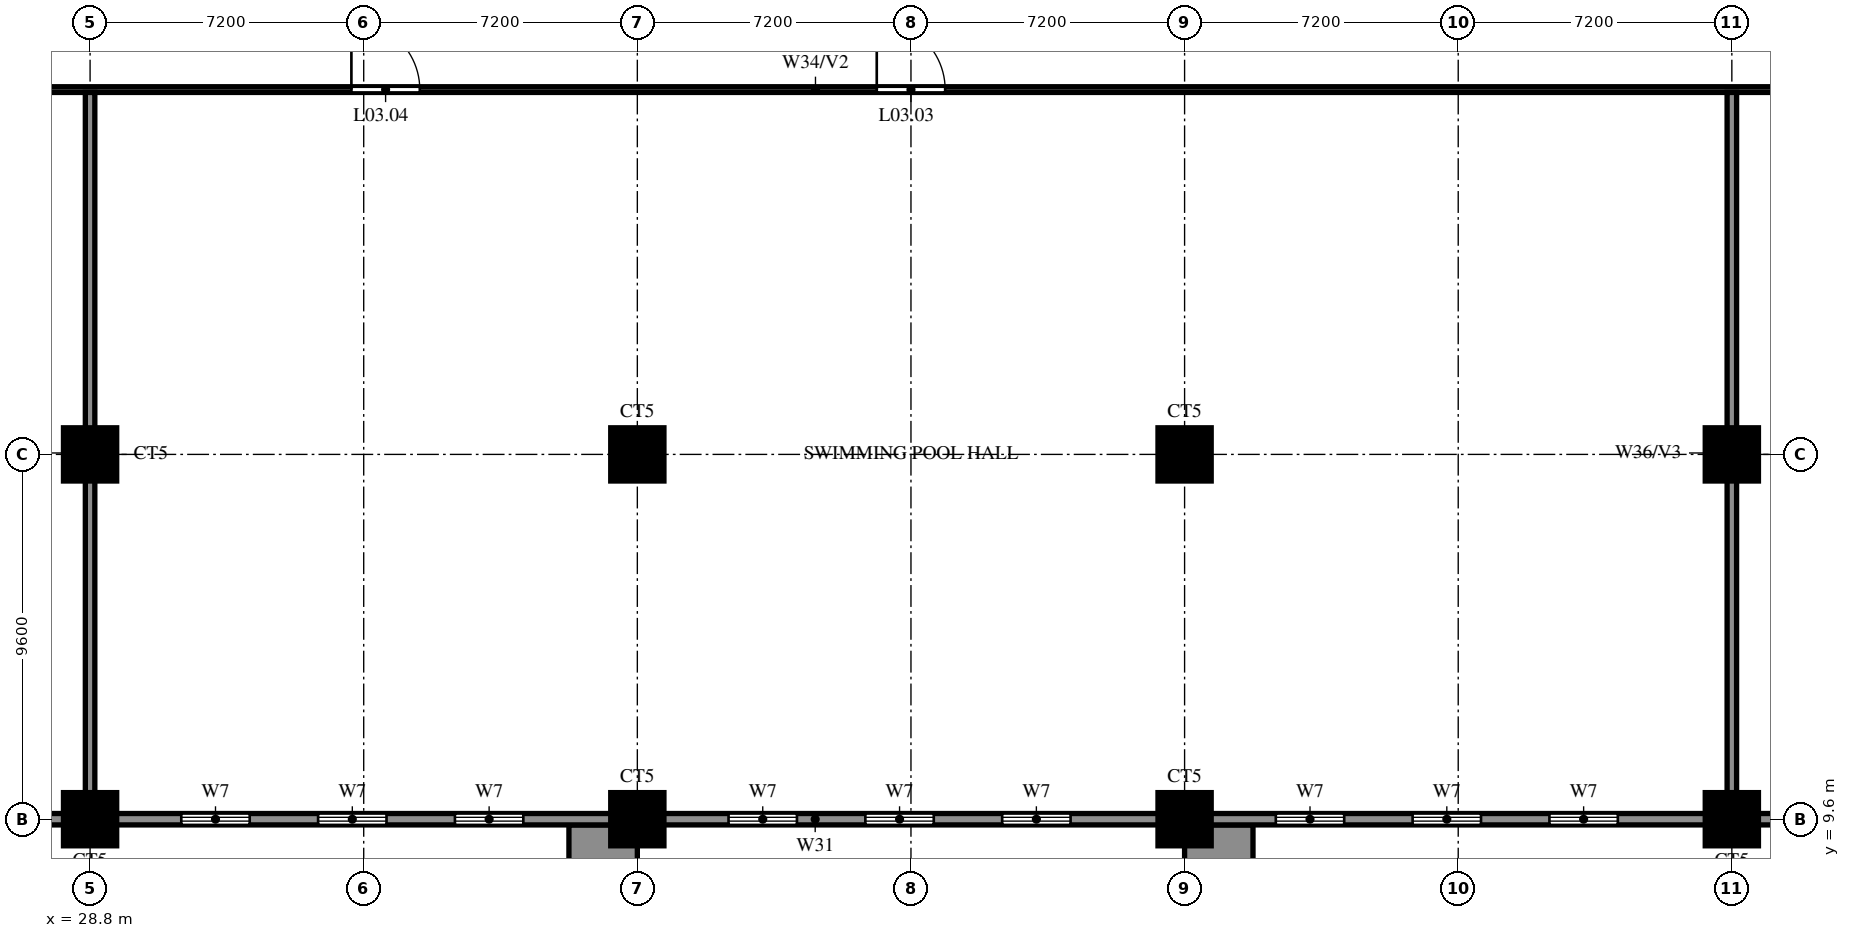
"""IFC4 building model, lengths in metres.
Left out: names, types, materials, properties, quantities, classifications, styles, units other than length and angle.
Written with IfcOpenShell. Run it as: python <this file> out.ifc"""

import sys

from ifc_helpers import new_model, si_unit, direction, frame, frame_2d, origin, origin_2d, place, context, subcontext, project, spatial, rectangle, circle, extrude, source, transform, mapped, element, fill, save


model = new_model("IFC4")
c1 = context("Model", 3, precision=1e-05, world=origin(), true_north=direction((0.0, 1.0)))
c2 = subcontext(c1, "Body", "Model", "MODEL_VIEW")
j1 = project(units=[si_unit("LENGTHUNIT", "METRE"), si_unit("PLANEANGLEUNIT", "RADIAN")], contexts=[c1])
p1 = place(None, origin())
s1 = spatial("IfcSite", under=j1, at=p1, CompositionType="ELEMENT")
p2 = place(p1, origin())
s2 = spatial("IfcBuilding", under=s1, at=p2, CompositionType="ELEMENT")
p3 = place(p2, frame((0.0, 0.0, 17.4)))
s3 = spatial("IfcBuildingStorey", under=s2, at=p3, CompositionType="ELEMENT", Elevation=17.4)
m1 = source(origin(), c2, "Body", "SweptSolid", [
    extrude(circle(Radius=0.7, at=origin_2d()), origin(), (0.0, 0.0, 1.0), 3.8),
])
for number, where, z_axis, x_axis in (
    (1, (28.8, 9.6, 0.0), (0.0, 0.0, 1.0), (1.0, 0.0, 0.0)),
    (2, (43.2, 9.6, 0.0), (0.0, 0.0, 1.0), (1.0, 0.0, 0.0)),
    (3, (57.6, 9.6, 0.0), (0.0, 0.0, 1.0), (1.0, 0.0, 0.0)),
    (4, (72.0, 9.6, 0.0), (0.0, 0.0, 1.0), (1.0, 0.0, 0.0)),
    (5, (28.8, 19.2, 0.0), (0.0, 0.0, 1.0), (1.0, 0.0, 0.0)),
    (6, (43.2, 19.2, 0.0), (0.0, 0.0, 1.0), (1.0, 0.0, 0.0)),
    (7, (57.6, 19.2, 0.0), (0.0, 0.0, 1.0), (1.0, 0.0, 0.0)),
    (8, (72.0, 19.2, 0.0), (0.0, 0.0, 1.0), (1.0, 0.0, 0.0)),
):
    element("IfcColumn", number, at=place(p3, frame(where, z_axis=z_axis, x_axis=x_axis)), inside=s3, PredefinedType="COLUMN", context=c2, shape_type="MappedRepresentation", body=[
        mapped(m1, transform((0.0, 0.0, 0.0))),
    ])
for number, where, z_axis, x_axis in (
    (9, (42.3, -2.55, 0.0), (0.0, 0.0, 1.0), (0.0, 1.0, 0.0)),
    (10, (58.5, -2.55, 0.0), (0.0, 0.0, 1.0), (0.0, 1.0, 0.0)),
):
    element("IfcWall", number, at=place(p3, frame(where, z_axis=z_axis, x_axis=x_axis)), inside=s3, PredefinedType="SOLIDWALL", context=c2, shape_type="SweptSolid", body=[
        extrude(rectangle(XDim=12.0, YDim=1.8, at=frame_2d((6.0, 0.0))), origin(), (0.0, 0.0, 1.0), 4.2),
    ])
p4 = place(p3, frame((0.0, 9.6, 0.0), z_axis=(0.0, 0.0, 1.0), x_axis=(1.0, 0.0, 0.0)))
e11 = element("IfcWall", 11, at=p4, inside=s3, PredefinedType="SOLIDWALL", context=c2, shape_type="SweptSolid", body=[
    extrude(rectangle(XDim=100.8, YDim=0.3, at=frame_2d((50.4, 0.0))), origin(), (0.0, 0.0, 1.0), 3.8),
])
p5 = place(p4, frame((2.4, 0.0, 0.6)))
e12 = element("IfcOpeningElement", 12, at=p5, cuts=e11, PredefinedType="OPENING", context=c2, shape_type="SweptSolid", body=[
    extrude(rectangle(XDim=1.8, YDim=2.4, at=frame_2d((0.9, 1.2))), frame((0.0, 0.16, 0.0), z_axis=(0.0, -1.0, 0.0), x_axis=(1.0, 0.0, 0.0)), (0.0, 0.0, 1.0), 0.32),
])
p6 = place(p4, frame((6.0, 0.0, 0.6)))
e13 = element("IfcOpeningElement", 13, at=p6, cuts=e11, PredefinedType="OPENING", context=c2, shape_type="SweptSolid", body=[
    extrude(rectangle(XDim=1.8, YDim=2.4, at=frame_2d((0.9, 1.2))), frame((0.0, 0.16, 0.0), z_axis=(0.0, -1.0, 0.0), x_axis=(1.0, 0.0, 0.0)), (0.0, 0.0, 1.0), 0.32),
])
p7 = place(p4, frame((9.6, 0.0, 0.6)))
e14 = element("IfcOpeningElement", 14, at=p7, cuts=e11, PredefinedType="OPENING", context=c2, shape_type="SweptSolid", body=[
    extrude(rectangle(XDim=1.8, YDim=2.4, at=frame_2d((0.9, 1.2))), frame((0.0, 0.16, 0.0), z_axis=(0.0, -1.0, 0.0), x_axis=(1.0, 0.0, 0.0)), (0.0, 0.0, 1.0), 0.32),
])
p8 = place(p4, frame((16.8, 0.0, 0.6)))
e15 = element("IfcOpeningElement", 15, at=p8, cuts=e11, PredefinedType="OPENING", context=c2, shape_type="SweptSolid", body=[
    extrude(rectangle(XDim=1.8, YDim=2.4, at=frame_2d((0.9, 1.2))), frame((0.0, 0.16, 0.0), z_axis=(0.0, -1.0, 0.0), x_axis=(1.0, 0.0, 0.0)), (0.0, 0.0, 1.0), 0.32),
])
p9 = place(p4, frame((20.4, 0.0, 0.6)))
e16 = element("IfcOpeningElement", 16, at=p9, cuts=e11, PredefinedType="OPENING", context=c2, shape_type="SweptSolid", body=[
    extrude(rectangle(XDim=1.8, YDim=2.4, at=frame_2d((0.9, 1.2))), frame((0.0, 0.16, 0.0), z_axis=(0.0, -1.0, 0.0), x_axis=(1.0, 0.0, 0.0)), (0.0, 0.0, 1.0), 0.32),
])
p10 = place(p4, frame((24.0, 0.0, 0.6)))
e17 = element("IfcOpeningElement", 17, at=p10, cuts=e11, PredefinedType="OPENING", context=c2, shape_type="SweptSolid", body=[
    extrude(rectangle(XDim=1.8, YDim=2.4, at=frame_2d((0.9, 1.2))), frame((0.0, 0.16, 0.0), z_axis=(0.0, -1.0, 0.0), x_axis=(1.0, 0.0, 0.0)), (0.0, 0.0, 1.0), 0.32),
])
p11 = place(p4, frame((31.2, 0.0, 0.6)))
e18 = element("IfcOpeningElement", 18, at=p11, cuts=e11, PredefinedType="OPENING", context=c2, shape_type="SweptSolid", body=[
    extrude(rectangle(XDim=1.8, YDim=2.4, at=frame_2d((0.9, 1.2))), frame((0.0, 0.16, 0.0), z_axis=(0.0, -1.0, 0.0), x_axis=(1.0, 0.0, 0.0)), (0.0, 0.0, 1.0), 0.32),
])
p12 = place(p4, frame((34.8, 0.0, 0.6)))
e19 = element("IfcOpeningElement", 19, at=p12, cuts=e11, PredefinedType="OPENING", context=c2, shape_type="SweptSolid", body=[
    extrude(rectangle(XDim=1.8, YDim=2.4, at=frame_2d((0.9, 1.2))), frame((0.0, 0.16, 0.0), z_axis=(0.0, -1.0, 0.0), x_axis=(1.0, 0.0, 0.0)), (0.0, 0.0, 1.0), 0.32),
])
p13 = place(p4, frame((38.4, 0.0, 0.6)))
e20 = element("IfcOpeningElement", 20, at=p13, cuts=e11, PredefinedType="OPENING", context=c2, shape_type="SweptSolid", body=[
    extrude(rectangle(XDim=1.8, YDim=2.4, at=frame_2d((0.9, 1.2))), frame((0.0, 0.16, 0.0), z_axis=(0.0, -1.0, 0.0), x_axis=(1.0, 0.0, 0.0)), (0.0, 0.0, 1.0), 0.32),
])
p14 = place(p4, frame((45.6, 0.0, 0.6)))
e21 = element("IfcOpeningElement", 21, at=p14, cuts=e11, PredefinedType="OPENING", context=c2, shape_type="SweptSolid", body=[
    extrude(rectangle(XDim=1.8, YDim=2.4, at=frame_2d((0.9, 1.2))), frame((0.0, 0.16, 0.0), z_axis=(0.0, -1.0, 0.0), x_axis=(1.0, 0.0, 0.0)), (0.0, 0.0, 1.0), 0.32),
])
p15 = place(p4, frame((49.2, 0.0, 0.6)))
e22 = element("IfcOpeningElement", 22, at=p15, cuts=e11, PredefinedType="OPENING", context=c2, shape_type="SweptSolid", body=[
    extrude(rectangle(XDim=1.8, YDim=2.4, at=frame_2d((0.9, 1.2))), frame((0.0, 0.16, 0.0), z_axis=(0.0, -1.0, 0.0), x_axis=(1.0, 0.0, 0.0)), (0.0, 0.0, 1.0), 0.32),
])
p16 = place(p4, frame((52.8, 0.0, 0.6)))
e23 = element("IfcOpeningElement", 23, at=p16, cuts=e11, PredefinedType="OPENING", context=c2, shape_type="SweptSolid", body=[
    extrude(rectangle(XDim=1.8, YDim=2.4, at=frame_2d((0.9, 1.2))), frame((0.0, 0.16, 0.0), z_axis=(0.0, -1.0, 0.0), x_axis=(1.0, 0.0, 0.0)), (0.0, 0.0, 1.0), 0.32),
])
p17 = place(p4, frame((60.0, 0.0, 0.6)))
e24 = element("IfcOpeningElement", 24, at=p17, cuts=e11, PredefinedType="OPENING", context=c2, shape_type="SweptSolid", body=[
    extrude(rectangle(XDim=1.8, YDim=2.4, at=frame_2d((0.9, 1.2))), frame((0.0, 0.16, 0.0), z_axis=(0.0, -1.0, 0.0), x_axis=(1.0, 0.0, 0.0)), (0.0, 0.0, 1.0), 0.32),
])
p18 = place(p4, frame((63.6, 0.0, 0.6)))
e25 = element("IfcOpeningElement", 25, at=p18, cuts=e11, PredefinedType="OPENING", context=c2, shape_type="SweptSolid", body=[
    extrude(rectangle(XDim=1.8, YDim=2.4, at=frame_2d((0.9, 1.2))), frame((0.0, 0.16, 0.0), z_axis=(0.0, -1.0, 0.0), x_axis=(1.0, 0.0, 0.0)), (0.0, 0.0, 1.0), 0.32),
])
p19 = place(p4, frame((67.2, 0.0, 0.6)))
e26 = element("IfcOpeningElement", 26, at=p19, cuts=e11, PredefinedType="OPENING", context=c2, shape_type="SweptSolid", body=[
    extrude(rectangle(XDim=1.8, YDim=2.4, at=frame_2d((0.9, 1.2))), frame((0.0, 0.16, 0.0), z_axis=(0.0, -1.0, 0.0), x_axis=(1.0, 0.0, 0.0)), (0.0, 0.0, 1.0), 0.32),
])
p20 = place(p4, frame((74.4, 0.0, 0.6)))
e27 = element("IfcOpeningElement", 27, at=p20, cuts=e11, PredefinedType="OPENING", context=c2, shape_type="SweptSolid", body=[
    extrude(rectangle(XDim=1.8, YDim=2.4, at=frame_2d((0.9, 1.2))), frame((0.0, 0.16, 0.0), z_axis=(0.0, -1.0, 0.0), x_axis=(1.0, 0.0, 0.0)), (0.0, 0.0, 1.0), 0.32),
])
p21 = place(p4, frame((78.0, 0.0, 0.6)))
e28 = element("IfcOpeningElement", 28, at=p21, cuts=e11, PredefinedType="OPENING", context=c2, shape_type="SweptSolid", body=[
    extrude(rectangle(XDim=1.8, YDim=2.4, at=frame_2d((0.9, 1.2))), frame((0.0, 0.16, 0.0), z_axis=(0.0, -1.0, 0.0), x_axis=(1.0, 0.0, 0.0)), (0.0, 0.0, 1.0), 0.32),
])
p22 = place(p4, frame((81.6, 0.0, 0.6)))
e29 = element("IfcOpeningElement", 29, at=p22, cuts=e11, PredefinedType="OPENING", context=c2, shape_type="SweptSolid", body=[
    extrude(rectangle(XDim=1.8, YDim=2.4, at=frame_2d((0.9, 1.2))), frame((0.0, 0.16, 0.0), z_axis=(0.0, -1.0, 0.0), x_axis=(1.0, 0.0, 0.0)), (0.0, 0.0, 1.0), 0.32),
])
p23 = place(p4, frame((88.8, 0.0, 0.6)))
e30 = element("IfcOpeningElement", 30, at=p23, cuts=e11, PredefinedType="OPENING", context=c2, shape_type="SweptSolid", body=[
    extrude(rectangle(XDim=1.8, YDim=2.4, at=frame_2d((0.9, 1.2))), frame((0.0, 0.16, 0.0), z_axis=(0.0, -1.0, 0.0), x_axis=(1.0, 0.0, 0.0)), (0.0, 0.0, 1.0), 0.32),
])
p24 = place(p4, frame((92.4, 0.0, 0.6)))
e31 = element("IfcOpeningElement", 31, at=p24, cuts=e11, PredefinedType="OPENING", context=c2, shape_type="SweptSolid", body=[
    extrude(rectangle(XDim=1.8, YDim=2.4, at=frame_2d((0.9, 1.2))), frame((0.0, 0.16, 0.0), z_axis=(0.0, -1.0, 0.0), x_axis=(1.0, 0.0, 0.0)), (0.0, 0.0, 1.0), 0.32),
])
p25 = place(p4, frame((96.0, 0.0, 0.6)))
e32 = element("IfcOpeningElement", 32, at=p25, cuts=e11, PredefinedType="OPENING", context=c2, shape_type="SweptSolid", body=[
    extrude(rectangle(XDim=1.8, YDim=2.4, at=frame_2d((0.9, 1.2))), frame((0.0, 0.16, 0.0), z_axis=(0.0, -1.0, 0.0), x_axis=(1.0, 0.0, 0.0)), (0.0, 0.0, 1.0), 0.32),
])
p26 = place(p3, frame((0.15, 28.8, 0.0), z_axis=(0.0, 0.0, 1.0), x_axis=(1.0, 0.0, 0.0)))
e33 = element("IfcWall", 33, at=p26, inside=s3, PredefinedType="PARTITIONING", context=c2, shape_type="SweptSolid", body=[
    extrude(rectangle(XDim=100.5, YDim=0.15, at=frame_2d((50.25, 0.0))), origin(), (0.0, 0.0, 1.0), 2.6),
])
p27 = place(p26, frame((13.35, 0.0, 0.0)))
e34 = element("IfcOpeningElement", 34, at=p27, cuts=e33, PredefinedType="OPENING", context=c2, shape_type="SweptSolid", body=[
    extrude(rectangle(XDim=1.8, YDim=2.1, at=frame_2d((0.9, 1.05))), frame((0.0, 0.085, 0.0), z_axis=(0.0, -1.0, 0.0), x_axis=(1.0, 0.0, 0.0)), (0.0, 0.0, 1.0), 0.17),
])
p28 = place(p26, frame((4.134, 0.0, 0.0)))
e35 = element("IfcOpeningElement", 35, at=p28, cuts=e33, PredefinedType="OPENING", context=c2, shape_type="SweptSolid", body=[
    extrude(rectangle(XDim=1.8, YDim=2.1, at=frame_2d((0.9, 1.05))), frame((0.0, 0.085, 0.0), z_axis=(0.0, -1.0, 0.0), x_axis=(1.0, 0.0, 0.0)), (0.0, 0.0, 1.0), 0.17),
])
p29 = place(p26, frame((49.35, 0.0, 0.0)))
e36 = element("IfcOpeningElement", 36, at=p29, cuts=e33, PredefinedType="OPENING", context=c2, shape_type="SweptSolid", body=[
    extrude(rectangle(XDim=1.8, YDim=2.1, at=frame_2d((0.9, 1.05))), frame((0.0, 0.085, 0.0), z_axis=(0.0, -1.0, 0.0), x_axis=(1.0, 0.0, 0.0)), (0.0, 0.0, 1.0), 0.17),
])
p30 = place(p26, frame((35.526, 0.0, 0.0)))
e37 = element("IfcOpeningElement", 37, at=p30, cuts=e33, PredefinedType="OPENING", context=c2, shape_type="SweptSolid", body=[
    extrude(rectangle(XDim=1.8, YDim=2.1, at=frame_2d((0.9, 1.05))), frame((0.0, 0.085, 0.0), z_axis=(0.0, -1.0, 0.0), x_axis=(1.0, 0.0, 0.0)), (0.0, 0.0, 1.0), 0.17),
])
p31 = place(p26, frame((85.35, 0.0, 0.0)))
e38 = element("IfcOpeningElement", 38, at=p31, cuts=e33, PredefinedType="OPENING", context=c2, shape_type="SweptSolid", body=[
    extrude(rectangle(XDim=1.8, YDim=2.1, at=frame_2d((0.9, 1.05))), frame((0.0, 0.085, 0.0), z_axis=(0.0, -1.0, 0.0), x_axis=(1.0, 0.0, 0.0)), (0.0, 0.0, 1.0), 0.17),
])
p32 = place(p26, frame((76.134, 0.0, 0.0)))
e39 = element("IfcOpeningElement", 39, at=p32, cuts=e33, PredefinedType="OPENING", context=c2, shape_type="SweptSolid", body=[
    extrude(rectangle(XDim=1.8, YDim=2.1, at=frame_2d((0.9, 1.05))), frame((0.0, 0.085, 0.0), z_axis=(0.0, -1.0, 0.0), x_axis=(1.0, 0.0, 0.0)), (0.0, 0.0, 1.0), 0.17),
])
for number, where, z_axis, x_axis in (
    (40, (28.8, 9.75, 0.0), (0.0, 0.0, 1.0), (0.0, 1.0, 0.0)),
    (41, (72.0, 9.75, 0.0), (0.0, 0.0, 1.0), (0.0, 1.0, 0.0)),
):
    element("IfcWall", number, at=place(p3, frame(where, z_axis=z_axis, x_axis=x_axis)), inside=s3, PredefinedType="SOLIDWALL", context=c2, shape_type="SweptSolid", body=[
        extrude(rectangle(XDim=18.975, YDim=0.25, at=frame_2d((9.488, 0.0))), origin(), (0.0, 0.0, 1.0), 2.6),
    ])
p33 = place(p29, origin())
e42 = element("IfcDoor", 42, at=p33, inside=s3, OperationType="DOUBLE_DOOR_SINGLE_SWING", PredefinedType="DOOR", context=c2, shape_type="SweptSolid", body=[
    extrude(rectangle(XDim=1.8, YDim=2.1, at=frame_2d((0.9, 1.05))), frame((0.0, 0.025, 0.0), z_axis=(0.0, -1.0, 0.0), x_axis=(1.0, 0.0, 0.0)), (0.0, 0.0, 1.0), 0.05),
])
fill(e36, e42)
p34 = place(p30, origin())
e43 = element("IfcDoor", 43, at=p34, inside=s3, OperationType="DOUBLE_DOOR_SINGLE_SWING", PredefinedType="DOOR", context=c2, shape_type="SweptSolid", body=[
    extrude(rectangle(XDim=1.8, YDim=2.1, at=frame_2d((0.9, 1.05))), frame((0.0, 0.025, 0.0), z_axis=(0.0, -1.0, 0.0), x_axis=(1.0, 0.0, 0.0)), (0.0, 0.0, 1.0), 0.05),
])
fill(e37, e43)
p35 = place(p11, origin())
e44 = element("IfcWindow", 44, at=p35, inside=s3, PartitioningType="DOUBLE_PANEL_VERTICAL", PredefinedType="WINDOW", context=c2, shape_type="SweptSolid", body=[
    extrude(rectangle(XDim=1.8, YDim=2.4, at=frame_2d((0.9, 1.2))), frame((0.0, 0.03, 0.0), z_axis=(0.0, -1.0, 0.0), x_axis=(1.0, 0.0, 0.0)), (0.0, 0.0, 1.0), 0.06),
])
fill(e18, e44)
p36 = place(p12, origin())
e45 = element("IfcWindow", 45, at=p36, inside=s3, PartitioningType="DOUBLE_PANEL_VERTICAL", PredefinedType="WINDOW", context=c2, shape_type="SweptSolid", body=[
    extrude(rectangle(XDim=1.8, YDim=2.4, at=frame_2d((0.9, 1.2))), frame((0.0, 0.03, 0.0), z_axis=(0.0, -1.0, 0.0), x_axis=(1.0, 0.0, 0.0)), (0.0, 0.0, 1.0), 0.06),
])
fill(e19, e45)
p37 = place(p13, origin())
e46 = element("IfcWindow", 46, at=p37, inside=s3, PartitioningType="DOUBLE_PANEL_VERTICAL", PredefinedType="WINDOW", context=c2, shape_type="SweptSolid", body=[
    extrude(rectangle(XDim=1.8, YDim=2.4, at=frame_2d((0.9, 1.2))), frame((0.0, 0.03, 0.0), z_axis=(0.0, -1.0, 0.0), x_axis=(1.0, 0.0, 0.0)), (0.0, 0.0, 1.0), 0.06),
])
fill(e20, e46)
p38 = place(p14, origin())
e47 = element("IfcWindow", 47, at=p38, inside=s3, PartitioningType="DOUBLE_PANEL_VERTICAL", PredefinedType="WINDOW", context=c2, shape_type="SweptSolid", body=[
    extrude(rectangle(XDim=1.8, YDim=2.4, at=frame_2d((0.9, 1.2))), frame((0.0, 0.03, 0.0), z_axis=(0.0, -1.0, 0.0), x_axis=(1.0, 0.0, 0.0)), (0.0, 0.0, 1.0), 0.06),
])
fill(e21, e47)
p39 = place(p15, origin())
e48 = element("IfcWindow", 48, at=p39, inside=s3, PartitioningType="DOUBLE_PANEL_VERTICAL", PredefinedType="WINDOW", context=c2, shape_type="SweptSolid", body=[
    extrude(rectangle(XDim=1.8, YDim=2.4, at=frame_2d((0.9, 1.2))), frame((0.0, 0.03, 0.0), z_axis=(0.0, -1.0, 0.0), x_axis=(1.0, 0.0, 0.0)), (0.0, 0.0, 1.0), 0.06),
])
fill(e22, e48)
p40 = place(p16, origin())
e49 = element("IfcWindow", 49, at=p40, inside=s3, PartitioningType="DOUBLE_PANEL_VERTICAL", PredefinedType="WINDOW", context=c2, shape_type="SweptSolid", body=[
    extrude(rectangle(XDim=1.8, YDim=2.4, at=frame_2d((0.9, 1.2))), frame((0.0, 0.03, 0.0), z_axis=(0.0, -1.0, 0.0), x_axis=(1.0, 0.0, 0.0)), (0.0, 0.0, 1.0), 0.06),
])
fill(e23, e49)
p41 = place(p17, origin())
e50 = element("IfcWindow", 50, at=p41, inside=s3, PartitioningType="DOUBLE_PANEL_VERTICAL", PredefinedType="WINDOW", context=c2, shape_type="SweptSolid", body=[
    extrude(rectangle(XDim=1.8, YDim=2.4, at=frame_2d((0.9, 1.2))), frame((0.0, 0.03, 0.0), z_axis=(0.0, -1.0, 0.0), x_axis=(1.0, 0.0, 0.0)), (0.0, 0.0, 1.0), 0.06),
])
fill(e24, e50)
p42 = place(p18, origin())
e51 = element("IfcWindow", 51, at=p42, inside=s3, PartitioningType="DOUBLE_PANEL_VERTICAL", PredefinedType="WINDOW", context=c2, shape_type="SweptSolid", body=[
    extrude(rectangle(XDim=1.8, YDim=2.4, at=frame_2d((0.9, 1.2))), frame((0.0, 0.03, 0.0), z_axis=(0.0, -1.0, 0.0), x_axis=(1.0, 0.0, 0.0)), (0.0, 0.0, 1.0), 0.06),
])
fill(e25, e51)
p43 = place(p19, origin())
e52 = element("IfcWindow", 52, at=p43, inside=s3, PartitioningType="DOUBLE_PANEL_VERTICAL", PredefinedType="WINDOW", context=c2, shape_type="SweptSolid", body=[
    extrude(rectangle(XDim=1.8, YDim=2.4, at=frame_2d((0.9, 1.2))), frame((0.0, 0.03, 0.0), z_axis=(0.0, -1.0, 0.0), x_axis=(1.0, 0.0, 0.0)), (0.0, 0.0, 1.0), 0.06),
])
fill(e26, e52)
save(model, sys.argv[1])
